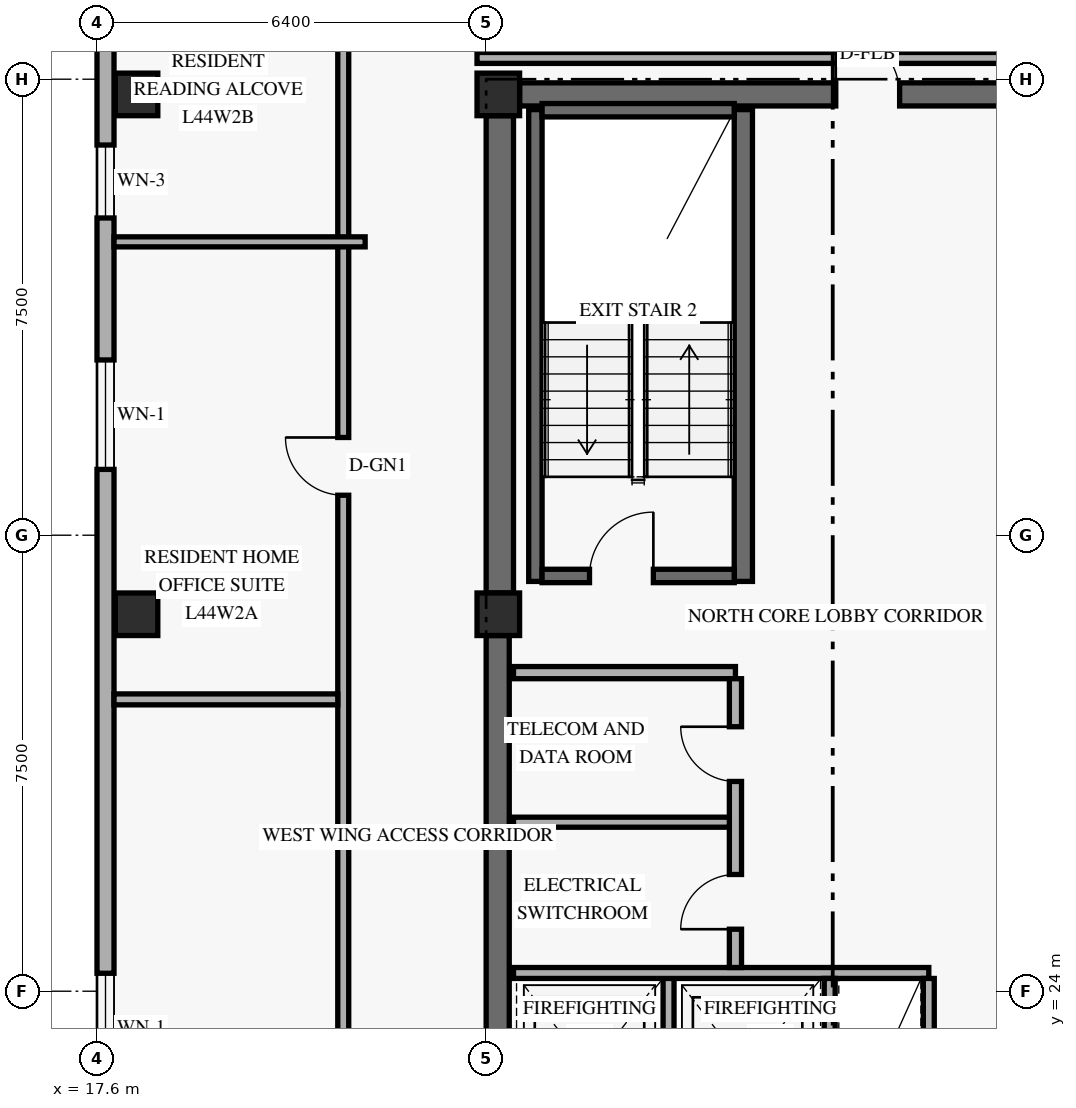
"""IFC4 building model, lengths in metres.
Left out: names, types, materials, properties, quantities, classifications, styles, units other than length and angle.
Written with IfcOpenShell. Run it as: python <this file> out.ifc"""

import sys

from ifc_helpers import new_model, si_unit, direction, frame, frame_2d, origin, origin_2d, place, context, subcontext, project, spatial, rectangle, extrude, element, fill, save


model = new_model("IFC4")
c1 = context("Model", 3, precision=1e-05, world=origin(), true_north=direction((0.0, 1.0)))
c2 = subcontext(c1, "Body", "Model", "MODEL_VIEW")
j1 = project(units=[si_unit("LENGTHUNIT", "METRE"), si_unit("PLANEANGLEUNIT", "RADIAN")], contexts=[c1])
p1 = place(None, origin())
s1 = spatial("IfcSite", under=j1, at=p1, CompositionType="ELEMENT")
p2 = place(p1, origin())
s2 = spatial("IfcBuilding", under=s1, at=p2, CompositionType="ELEMENT")
p3 = place(p2, frame((0.0, 0.0, 169.8)))
s3 = spatial("IfcBuildingStorey", under=s2, at=p3, CompositionType="ELEMENT", Elevation=169.8)
p4 = place(p3, frame((24.19, 17.9, 0.0), z_axis=(0.0, 0.0, 1.0), x_axis=(0.0, 1.0, 0.0)))
e1 = element("IfcWall", 1, at=p4, inside=s3, PredefinedType="SHEAR", context=c2, shape_type="SweptSolid", body=[
    extrude(rectangle(XDim=11.95, YDim=0.38, at=frame_2d((5.975, 0.0))), origin(), (0.0, 0.0, 1.0), 2.738),
])
p5 = place(p3, frame((24.225, 30.55, 0.0), z_axis=(0.0, 0.0, 1.0), x_axis=(0.0, 1.0, 0.0)))
e2 = element("IfcWall", 2, at=p5, inside=s3, PredefinedType="SHEAR", context=c2, shape_type="SweptSolid", body=[
    extrude(rectangle(XDim=7.85, YDim=0.45, at=frame_2d((3.925, 0.0))), origin(), (0.0, 0.0, 1.0), 2.738),
])
p6 = place(p3, frame((24.55, 38.75, 0.0), z_axis=(0.0, 0.0, 1.0), x_axis=(1.0, 0.0, 0.0)))
e3 = element("IfcWall", 3, at=p6, inside=s3, PredefinedType="SHEAR", context=c2, shape_type="SweptSolid", body=[
    extrude(rectangle(XDim=10.3, YDim=0.38, at=frame_2d((5.15, 0.0))), origin(), (0.0, 0.0, 1.0), 3.35),
])
p7 = place(p6, frame((5.2, 0.0, 0.0)))
e4 = element("IfcOpeningElement", 4, at=p7, cuts=e3, PredefinedType="OPENING", context=c2, shape_type="SweptSolid", body=[
    extrude(rectangle(XDim=1.05, YDim=2.15, at=frame_2d((0.525, 1.075))), frame((0.0, 0.2, 0.0), z_axis=(0.0, -1.0, 0.0), x_axis=(1.0, 0.0, 0.0)), (0.0, 0.0, 1.0), 0.4),
])
p8 = place(p3, frame((24.81, 30.74, 0.0), z_axis=(0.0, 0.0, 1.0), x_axis=(0.0, 1.0, 0.0)))
e5 = element("IfcWall", 5, at=p8, inside=s3, PredefinedType="SHEAR", context=c2, shape_type="SweptSolid", body=[
    extrude(rectangle(XDim=7.76, YDim=0.22, at=frame_2d((3.88, 0.0))), origin(), (0.0, 0.0, 1.0), 3.35),
])
p9 = place(p3, frame((28.23, 30.74, 0.0), z_axis=(0.0, 0.0, 1.0), x_axis=(0.0, 1.0, 0.0)))
e6 = element("IfcWall", 6, at=p9, inside=s3, PredefinedType="SHEAR", context=c2, shape_type="SweptSolid", body=[
    extrude(rectangle(XDim=7.76, YDim=0.3, at=frame_2d((3.88, 0.0))), origin(), (0.0, 0.0, 1.0), 3.35),
])
p10 = place(p3, frame((24.92, 30.83, 0.0), z_axis=(0.0, 0.0, 1.0), x_axis=(1.0, 0.0, 0.0)))
e7 = element("IfcWall", 7, at=p10, inside=s3, PredefinedType="SHEAR", context=c2, shape_type="SweptSolid", body=[
    extrude(rectangle(XDim=3.16, YDim=0.22, at=frame_2d((1.58, 0.0))), origin(), (0.0, 0.0, 1.0), 3.35),
])
p11 = place(p10, frame((0.78, 0.0, 0.0)))
e8 = element("IfcOpeningElement", 8, at=p11, cuts=e7, PredefinedType="OPENING", context=c2, shape_type="SweptSolid", body=[
    extrude(rectangle(XDim=1.05, YDim=2.15, at=frame_2d((0.525, 1.075))), frame((0.0, 0.12, 0.0), z_axis=(0.0, -1.0, 0.0), x_axis=(1.0, 0.0, 0.0)), (0.0, 0.0, 1.0), 0.24),
])
p12 = place(p3, frame((24.92, 38.49, 0.0), z_axis=(0.0, 0.0, 1.0), x_axis=(1.0, 0.0, 0.0)))
e9 = element("IfcWall", 9, at=p12, inside=s3, PredefinedType="SHEAR", context=c2, shape_type="SweptSolid", body=[
    extrude(rectangle(XDim=3.16, YDim=0.22, at=frame_2d((1.58, 0.0))), origin(), (0.0, 0.0, 1.0), 3.35),
])
for number, where, z_axis, x_axis in (
    (10, (18.25, 30.2, 0.0), (0.0, 0.0, 1.0), (1.0, 0.0, 0.0)),
    (11, (18.25, 38.75, 0.0), (0.0, 0.0, 1.0), (1.0, 0.0, 0.0)),
    (12, (24.2, 30.2, 0.0), (0.0, 0.0, 1.0), (1.0, 0.0, 0.0)),
    (13, (24.2, 38.75, 0.0), (0.0, 0.0, 1.0), (1.0, 0.0, 0.0)),
):
    element("IfcColumn", number, at=place(p3, frame(where, z_axis=z_axis, x_axis=x_axis)), inside=s3, PredefinedType="COLUMN", context=c2, shape_type="SweptSolid", body=[
        extrude(rectangle(XDim=0.7, YDim=0.7, at=origin_2d()), origin(), (0.0, 0.0, 1.0), 3.6),
    ])
p13 = place(p3, frame((17.74, 40.38, 0.0), z_axis=(0.0, 0.0, 1.0), x_axis=(0.0, -1.0, 0.0)))
e14 = element("IfcWall", 14, at=p13, inside=s3, PredefinedType="SOLIDWALL", context=c2, shape_type="SweptSolid", body=[
    extrude(rectangle(XDim=32.76, YDim=0.28, at=frame_2d((16.38, 0.0))), origin(), (0.0, 0.0, 1.0), 3.35),
])
p14 = place(p13, frame((26.623, 0.0, 0.85)))
e15 = element("IfcOpeningElement", 15, at=p14, cuts=e14, PredefinedType="OPENING", context=c2, shape_type="SweptSolid", body=[
    extrude(rectangle(XDim=1.8, YDim=1.6, at=frame_2d((0.9, 0.8))), frame((0.0, 0.15, 0.0), z_axis=(0.0, -1.0, 0.0), x_axis=(1.0, 0.0, 0.0)), (0.0, 0.0, 1.0), 0.3),
])
p15 = place(p13, frame((16.085, 0.0, 0.85)))
e16 = element("IfcOpeningElement", 16, at=p15, cuts=e14, PredefinedType="OPENING", context=c2, shape_type="SweptSolid", body=[
    extrude(rectangle(XDim=1.8, YDim=1.6, at=frame_2d((0.9, 0.8))), frame((0.0, 0.15, 0.0), z_axis=(0.0, -1.0, 0.0), x_axis=(1.0, 0.0, 0.0)), (0.0, 0.0, 1.0), 0.3),
])
p16 = place(p13, frame((5.998, 0.0, 0.85)))
e17 = element("IfcOpeningElement", 17, at=p16, cuts=e14, PredefinedType="OPENING", context=c2, shape_type="SweptSolid", body=[
    extrude(rectangle(XDim=1.8, YDim=1.6, at=frame_2d((0.9, 0.8))), frame((0.0, 0.15, 0.0), z_axis=(0.0, -1.0, 0.0), x_axis=(1.0, 0.0, 0.0)), (0.0, 0.0, 1.0), 0.3),
])
p17 = place(p13, frame((2.462, 0.0, 0.85)))
e18 = element("IfcOpeningElement", 18, at=p17, cuts=e14, PredefinedType="OPENING", context=c2, shape_type="SweptSolid", body=[
    extrude(rectangle(XDim=1.2, YDim=1.5, at=frame_2d((0.6, 0.75))), frame((0.0, 0.15, 0.0), z_axis=(0.0, -1.0, 0.0), x_axis=(1.0, 0.0, 0.0)), (0.0, 0.0, 1.0), 0.3),
])
p18 = place(p3, frame((27.0, 21.19, 0.0), z_axis=(0.0, 0.0, 1.0), x_axis=(0.0, 1.0, 0.0)))
e19 = element("IfcWall", 19, at=p18, inside=s3, PredefinedType="STANDARD", context=c2, shape_type="SweptSolid", body=[
    extrude(rectangle(XDim=3.11, YDim=0.18, at=frame_2d((1.555, 0.0))), origin(), (0.0, 0.0, 1.0), 3.35),
])
p19 = place(p3, frame((24.45, 24.3, 0.0), z_axis=(0.0, 0.0, 1.0), x_axis=(1.0, 0.0, 0.0)))
e20 = element("IfcWall", 20, at=p19, inside=s3, PredefinedType="STANDARD", context=c2, shape_type="SweptSolid", body=[
    extrude(rectangle(XDim=6.83, YDim=0.18, at=frame_2d((3.415, 0.0))), origin(), (0.0, 0.0, 1.0), 3.35),
])
for number, where, z_axis, x_axis in (
    (21, (29.65, 21.19, 0.0), (0.0, 0.0, 1.0), (0.0, 1.0, 0.0)),
    (22, (31.28, 21.19, 0.0), (0.0, 0.0, 1.0), (0.0, 1.0, 0.0)),
):
    element("IfcWall", number, at=place(p3, frame(where, z_axis=z_axis, x_axis=x_axis)), inside=s3, PredefinedType="STANDARD", context=c2, shape_type="SweptSolid", body=[
        extrude(rectangle(XDim=3.02, YDim=0.18, at=frame_2d((1.51, 0.0))), origin(), (0.0, 0.0, 1.0), 3.35),
    ])
p20 = place(p3, frame((24.45, 29.24, 0.0), z_axis=(0.0, 0.0, 1.0), x_axis=(1.0, 0.0, 0.0)))
e23 = element("IfcWall", 23, at=p20, inside=s3, PredefinedType="STANDARD", context=c2, shape_type="SweptSolid", body=[
    extrude(rectangle(XDim=3.65, YDim=0.2, at=frame_2d((1.825, 0.0))), origin(), (0.0, 0.0, 1.0), 3.35),
])
p21 = place(p3, frame((28.1, 24.39, 0.0), z_axis=(0.0, 0.0, 1.0), x_axis=(0.0, 1.0, 0.0)))
e24 = element("IfcWall", 24, at=p21, inside=s3, PredefinedType="STANDARD", context=c2, shape_type="SweptSolid", body=[
    extrude(rectangle(XDim=4.75, YDim=0.2, at=frame_2d((2.375, 0.0))), origin(), (0.0, 0.0, 1.0), 3.35),
])
p22 = place(p21, frame((0.63, 0.0, 0.0)))
e25 = element("IfcOpeningElement", 25, at=p22, cuts=e24, PredefinedType="OPENING", context=c2, shape_type="SweptSolid", body=[
    extrude(rectangle(XDim=0.9, YDim=2.1, at=frame_2d((0.45, 1.05))), frame((0.0, 0.11, 0.0), z_axis=(0.0, -1.0, 0.0), x_axis=(1.0, 0.0, 0.0)), (0.0, 0.0, 1.0), 0.22),
])
p23 = place(p21, frame((3.06, 0.0, 0.0)))
e26 = element("IfcOpeningElement", 26, at=p23, cuts=e24, PredefinedType="OPENING", context=c2, shape_type="SweptSolid", body=[
    extrude(rectangle(XDim=0.9, YDim=2.1, at=frame_2d((0.45, 1.05))), frame((0.0, 0.11, 0.0), z_axis=(0.0, -1.0, 0.0), x_axis=(1.0, 0.0, 0.0)), (0.0, 0.0, 1.0), 0.22),
])
p24 = place(p3, frame((24.45, 26.78, 0.0), z_axis=(0.0, 0.0, 1.0), x_axis=(1.0, 0.0, 0.0)))
e27 = element("IfcWall", 27, at=p24, inside=s3, PredefinedType="PARTITIONING", context=c2, shape_type="SweptSolid", body=[
    extrude(rectangle(XDim=3.55, YDim=0.165, at=frame_2d((1.775, 0.0))), origin(), (0.0, 0.0, 1.0), 3.35),
])
p25 = place(p3, frame((21.65, 6.8, 0.0), z_axis=(0.0, 0.0, 1.0), x_axis=(0.0, 1.0, 0.0)))
e28 = element("IfcWall", 28, at=p25, inside=s3, PredefinedType="STANDARD", context=c2, shape_type="SweptSolid", body=[
    extrude(rectangle(XDim=34.4, YDim=0.18, at=frame_2d((17.2, 0.0))), origin(), (0.0, 0.0, 1.0), 2.72),
])
p26 = place(p25, frame((2.883, 0.0, 0.0)))
e29 = element("IfcOpeningElement", 29, at=p26, cuts=e28, PredefinedType="OPENING", context=c2, shape_type="SweptSolid", body=[
    extrude(rectangle(XDim=0.95, YDim=2.15, at=frame_2d((0.475, 1.075))), frame((0.0, 0.1, 0.0), z_axis=(0.0, -1.0, 0.0), x_axis=(1.0, 0.0, 0.0)), (0.0, 0.0, 1.0), 0.2),
])
p27 = place(p25, frame((15.117, 0.0, 0.0)))
e30 = element("IfcOpeningElement", 30, at=p27, cuts=e28, PredefinedType="OPENING", context=c2, shape_type="SweptSolid", body=[
    extrude(rectangle(XDim=0.95, YDim=2.15, at=frame_2d((0.475, 1.075))), frame((0.0, 0.1, 0.0), z_axis=(0.0, -1.0, 0.0), x_axis=(1.0, 0.0, 0.0)), (0.0, 0.0, 1.0), 0.2),
])
p28 = place(p25, frame((25.357, 0.0, 0.0)))
e31 = element("IfcOpeningElement", 31, at=p28, cuts=e28, PredefinedType="OPENING", context=c2, shape_type="SweptSolid", body=[
    extrude(rectangle(XDim=0.95, YDim=2.15, at=frame_2d((0.475, 1.075))), frame((0.0, 0.1, 0.0), z_axis=(0.0, -1.0, 0.0), x_axis=(1.0, 0.0, 0.0)), (0.0, 0.0, 1.0), 0.2),
])
p29 = place(p25, frame((32.792, 0.0, 0.0)))
e32 = element("IfcOpeningElement", 32, at=p29, cuts=e28, PredefinedType="OPENING", context=c2, shape_type="SweptSolid", body=[
    extrude(rectangle(XDim=0.95, YDim=2.15, at=frame_2d((0.475, 1.075))), frame((0.0, 0.1, 0.0), z_axis=(0.0, -1.0, 0.0), x_axis=(1.0, 0.0, 0.0)), (0.0, 0.0, 1.0), 0.2),
])
p30 = place(p3, frame((23.85, 39.35, 0.0), z_axis=(0.0, 0.0, 1.0), x_axis=(1.0, 0.0, 0.0)))
e33 = element("IfcWall", 33, at=p30, inside=s3, PredefinedType="STANDARD", context=c2, shape_type="SweptSolid", body=[
    extrude(rectangle(XDim=11.57, YDim=0.18, at=frame_2d((5.785, 0.0))), origin(), (0.0, 0.0, 1.0), 2.72),
])
p31 = place(p3, frame((17.88, 28.8, 0.0), z_axis=(0.0, 0.0, 1.0), x_axis=(1.0, 0.0, 0.0)))
e34 = element("IfcWall", 34, at=p31, inside=s3, PredefinedType="PARTITIONING", context=c2, shape_type="SweptSolid", body=[
    extrude(rectangle(XDim=3.68, YDim=0.18, at=frame_2d((1.84, 0.0))), origin(), (0.0, 0.0, 1.0), 2.869),
])
p32 = place(p3, frame((17.88, 36.325, 0.0), z_axis=(0.0, 0.0, 1.0), x_axis=(1.0, 0.0, 0.0)))
e35 = element("IfcWall", 35, at=p32, inside=s3, PredefinedType="PARTITIONING", context=c2, shape_type="SweptSolid", body=[
    extrude(rectangle(XDim=4.13, YDim=0.165, at=frame_2d((2.065, 0.0))), origin(), (0.0, 0.0, 1.0), 2.869),
])
p33 = place(p15, origin())
e36 = element("IfcWindow", 36, at=p33, inside=s3, PartitioningType="SINGLE_PANEL", PredefinedType="WINDOW", context=c2, shape_type="SweptSolid", body=[
    extrude(rectangle(XDim=1.8, YDim=1.6, at=frame_2d((0.9, 0.8))), frame((0.0, 0.03, 0.0), z_axis=(0.0, -1.0, 0.0), x_axis=(1.0, 0.0, 0.0)), (0.0, 0.0, 1.0), 0.06),
])
fill(e16, e36)
p34 = place(p16, origin())
e37 = element("IfcWindow", 37, at=p34, inside=s3, PartitioningType="SINGLE_PANEL", PredefinedType="WINDOW", context=c2, shape_type="SweptSolid", body=[
    extrude(rectangle(XDim=1.8, YDim=1.6, at=frame_2d((0.9, 0.8))), frame((0.0, 0.03, 0.0), z_axis=(0.0, -1.0, 0.0), x_axis=(1.0, 0.0, 0.0)), (0.0, 0.0, 1.0), 0.06),
])
fill(e17, e37)
p35 = place(p17, origin())
e38 = element("IfcWindow", 38, at=p35, inside=s3, PartitioningType="SINGLE_PANEL", PredefinedType="WINDOW", context=c2, shape_type="SweptSolid", body=[
    extrude(rectangle(XDim=1.2, YDim=1.5, at=frame_2d((0.6, 0.75))), frame((0.0, 0.03, 0.0), z_axis=(0.0, -1.0, 0.0), x_axis=(1.0, 0.0, 0.0)), (0.0, 0.0, 1.0), 0.06),
])
fill(e18, e38)
p36 = place(p11, origin())
e39 = element("IfcDoor", 39, at=p36, inside=s3, OperationType="SINGLE_SWING_RIGHT", PredefinedType="DOOR", context=c2, shape_type="SweptSolid", body=[
    extrude(rectangle(XDim=1.05, YDim=2.15, at=frame_2d((0.525, 1.075))), frame((0.0, 0.025, 0.0), z_axis=(0.0, -1.0, 0.0), x_axis=(1.0, 0.0, 0.0)), (0.0, 0.0, 1.0), 0.05),
])
fill(e8, e39)
p37 = place(p22, origin())
e40 = element("IfcDoor", 40, at=p37, inside=s3, OperationType="SINGLE_SWING_LEFT", PredefinedType="DOOR", context=c2, shape_type="SweptSolid", body=[
    extrude(rectangle(XDim=0.9, YDim=2.1, at=frame_2d((0.45, 1.05))), frame((0.0, 0.025, 0.0), z_axis=(0.0, -1.0, 0.0), x_axis=(1.0, 0.0, 0.0)), (0.0, 0.0, 1.0), 0.05),
])
fill(e25, e40)
p38 = place(p23, origin())
e41 = element("IfcDoor", 41, at=p38, inside=s3, OperationType="SINGLE_SWING_RIGHT", PredefinedType="DOOR", context=c2, shape_type="SweptSolid", body=[
    extrude(rectangle(XDim=0.9, YDim=2.1, at=frame_2d((0.45, 1.05))), frame((0.0, 0.025, 0.0), z_axis=(0.0, -1.0, 0.0), x_axis=(1.0, 0.0, 0.0)), (0.0, 0.0, 1.0), 0.05),
])
fill(e26, e41)
p39 = place(p7, frame((1.05, 0.0, 0.0), z_axis=(0.0, 0.0, 1.0), x_axis=(-1.0, 0.0, 0.0)))
e42 = element("IfcDoor", 42, at=p39, inside=s3, OperationType="SINGLE_SWING_RIGHT", PredefinedType="DOOR", context=c2, shape_type="SweptSolid", body=[
    extrude(rectangle(XDim=1.05, YDim=2.15, at=frame_2d((0.525, 1.075))), frame((0.0, 0.025, 0.0), z_axis=(0.0, -1.0, 0.0), x_axis=(1.0, 0.0, 0.0)), (0.0, 0.0, 1.0), 0.05),
])
fill(e4, e42)
p40 = place(p28, origin())
e43 = element("IfcDoor", 43, at=p40, inside=s3, OperationType="SINGLE_SWING_RIGHT", PredefinedType="DOOR", context=c2, shape_type="SweptSolid", body=[
    extrude(rectangle(XDim=0.95, YDim=2.15, at=frame_2d((0.475, 1.075))), frame((0.0, 0.025, 0.0), z_axis=(0.0, -1.0, 0.0), x_axis=(1.0, 0.0, 0.0)), (0.0, 0.0, 1.0), 0.05),
])
fill(e31, e43)
save(model, sys.argv[1])
